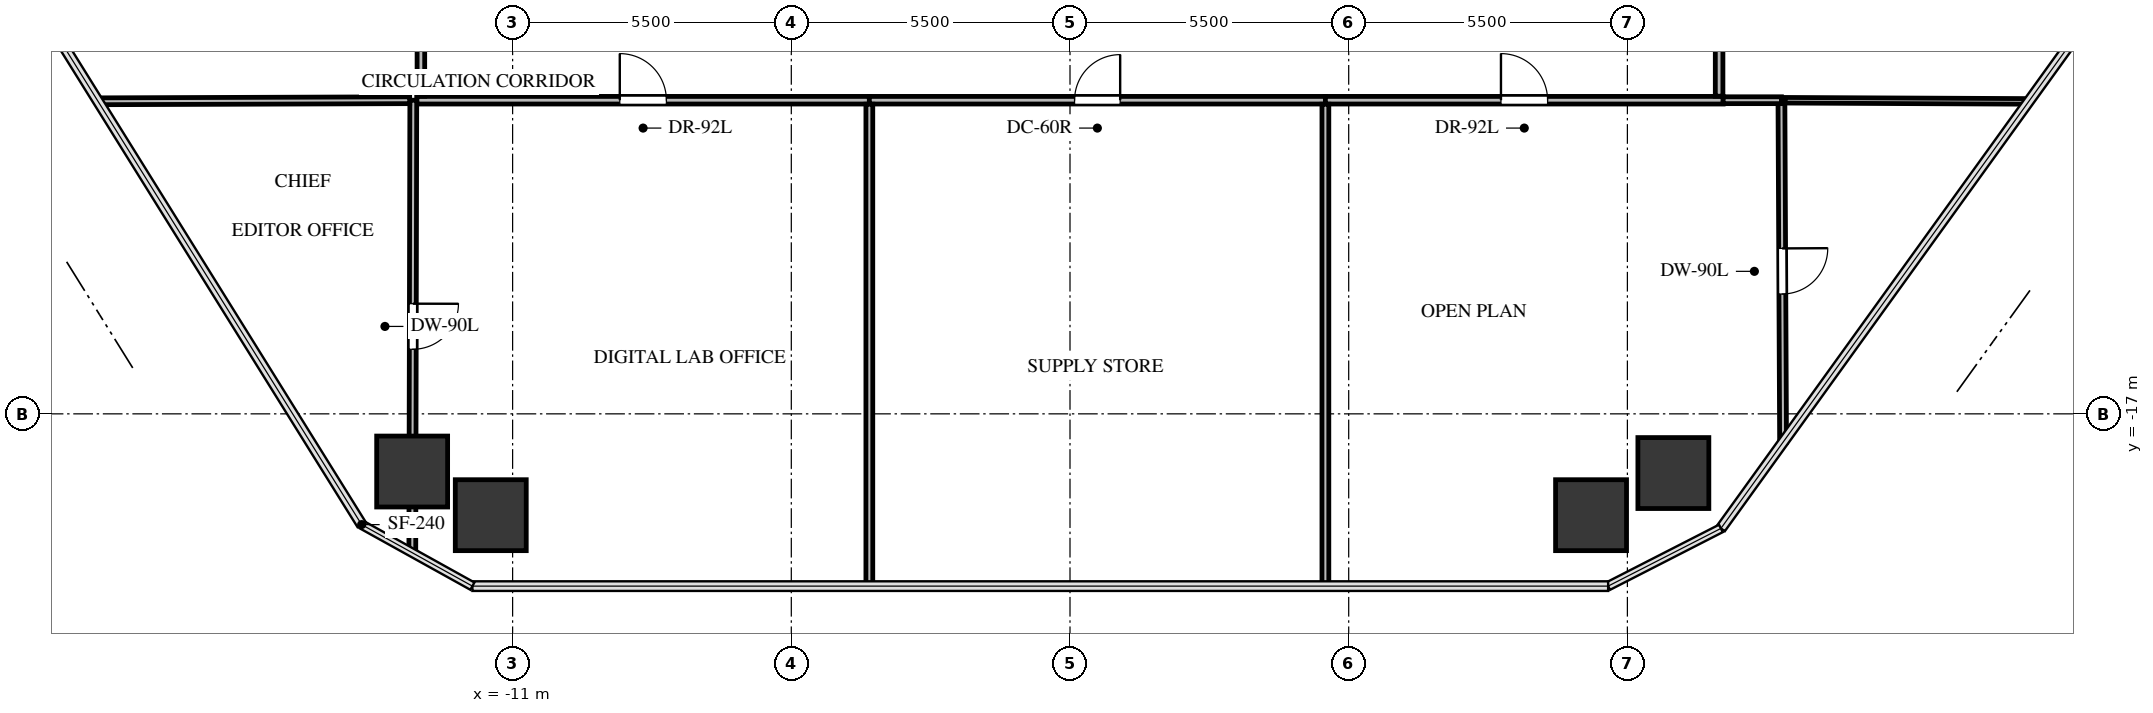
"""IFC4 building model, lengths in metres.
Left out: names, types, materials, properties, quantities, classifications, styles, units other than length and angle.
Written with IfcOpenShell. Run it as: python <this file> out.ifc"""

import sys

from ifc_helpers import new_model, si_unit, direction, frame, frame_2d, origin, origin_2d, place, context, subcontext, project, spatial, rectangle, extrude, source, transform, mapped, element, fill, save


model = new_model("IFC4")
c1 = context("Model", 3, precision=1e-05, world=origin(), true_north=direction((0.0, 1.0)))
c2 = subcontext(c1, "Body", "Model", "MODEL_VIEW")
j1 = project(units=[si_unit("LENGTHUNIT", "METRE"), si_unit("PLANEANGLEUNIT", "RADIAN")], contexts=[c1])
p1 = place(None, origin())
s1 = spatial("IfcSite", under=j1, at=p1, CompositionType="ELEMENT")
p2 = place(p1, origin())
s2 = spatial("IfcBuilding", under=s1, at=p2, CompositionType="ELEMENT")
p3 = place(p2, frame((0.0, 0.0, 84.3)))
s3 = spatial("IfcBuildingStorey", under=s2, at=p3, CompositionType="ELEMENT", Elevation=84.3)
m1 = source(origin(), c2, "Body", "SweptSolid", [
    extrude(rectangle(XDim=1.4, YDim=1.4, at=origin_2d()), origin(), (0.0, 0.0, 1.0), 4.14),
])
for number, where, z_axis, x_axis in (
    (1, (-12.983, -18.138, -0.24), (0.0, 0.0, 1.0), (1.0, 0.0, 0.0)),
    (2, (11.907, -18.168, -0.24), (0.0, 0.0, 1.0), (1.0, 0.0, 0.0)),
    (3, (10.283, -19.0, -0.24), (0.0, 0.0, 1.0), (1.0, 0.0, 0.0)),
    (4, (-11.431, -19.0, -0.24), (0.0, 0.0, 1.0), (1.0, 0.0, 0.0)),
):
    element("IfcColumn", number, at=place(p3, frame(where, z_axis=z_axis, x_axis=x_axis)), inside=s3, PredefinedType="COLUMN", context=c2, shape_type="MappedRepresentation", body=[
        mapped(m1, transform((0.0, 0.0, 0.0), x_axis=(1.0, 0.0, 0.0), y_axis=(0.0, 1.0, 0.0), z_axis=(0.0, 0.0, 1.0), scale=1.0)),
    ])
p4 = place(p3, frame((-12.89, -10.81, 0.0), z_axis=(0.0, 0.0, 1.0), x_axis=(1.0, 0.0, 0.0)))
e5 = element("IfcWall", 5, at=p4, inside=s3, PredefinedType="PARTITIONING", context=c2, shape_type="SweptSolid", body=[
    extrude(rectangle(XDim=8.93, YDim=0.15, at=frame_2d((4.465, 0.0))), origin(), (0.0, 0.0, 1.0), 2.32),
])
p5 = place(p4, frame((4.005, 0.0, 0.0)))
e6 = element("IfcOpeningElement", 6, at=p5, cuts=e5, PredefinedType="OPENING", context=c2, shape_type="SweptSolid", body=[
    extrude(rectangle(XDim=0.92, YDim=2.1, at=frame_2d((0.46, 1.05))), frame((0.0, 0.085, 0.0), z_axis=(0.0, -1.0, 0.0), x_axis=(1.0, 0.0, 0.0)), (0.0, 0.0, 1.0), 0.17),
])
p6 = place(p3, frame((-3.96, -10.81, 0.0), z_axis=(0.0, 0.0, 1.0), x_axis=(1.0, 0.0, 0.0)))
e7 = element("IfcWall", 7, at=p6, inside=s3, PredefinedType="PARTITIONING", context=c2, shape_type="SweptSolid", body=[
    extrude(rectangle(XDim=9.0, YDim=0.15, at=frame_2d((4.5, 0.0))), origin(), (0.0, 0.0, 1.0), 2.32),
])
p7 = place(p6, frame((4.05, 0.0, 0.0)))
e8 = element("IfcOpeningElement", 8, at=p7, cuts=e7, PredefinedType="OPENING", context=c2, shape_type="SweptSolid", body=[
    extrude(rectangle(XDim=0.9, YDim=2.05, at=frame_2d((0.45, 1.025))), frame((0.0, 0.085, 0.0), z_axis=(0.0, -1.0, 0.0), x_axis=(1.0, 0.0, 0.0)), (0.0, 0.0, 1.0), 0.17),
])
p8 = place(p3, frame((5.04, -10.81, 0.0), z_axis=(0.0, 0.0, 1.0), x_axis=(1.0, 0.0, 0.0)))
e9 = element("IfcWall", 9, at=p8, inside=s3, PredefinedType="PARTITIONING", context=c2, shape_type="SweptSolid", body=[
    extrude(rectangle(XDim=7.85, YDim=0.15, at=frame_2d((3.925, 0.0))), origin(), (0.0, 0.0, 1.0), 2.32),
])
p9 = place(p8, frame((3.465, 0.0, 0.0)))
e10 = element("IfcOpeningElement", 10, at=p9, cuts=e9, PredefinedType="OPENING", context=c2, shape_type="SweptSolid", body=[
    extrude(rectangle(XDim=0.92, YDim=2.1, at=frame_2d((0.46, 1.05))), frame((0.0, 0.085, 0.0), z_axis=(0.0, -1.0, 0.0), x_axis=(1.0, 0.0, 0.0)), (0.0, 0.0, 1.0), 0.17),
])
p10 = place(p3, frame((-12.81, 10.731, 0.0), z_axis=(0.0, 0.0, 1.0), x_axis=(0.0, -1.0, 0.0)))
e11 = element("IfcWall", 11, at=p10, inside=s3, PredefinedType="PARTITIONING", context=c2, shape_type="SweptSolid", body=[
    extrude(rectangle(XDim=21.462, YDim=0.15, at=frame_2d((10.731, 0.0))), origin(), (0.0, 0.0, 1.0), 2.32),
])
p11 = place(p10, frame((10.271, 0.0, 0.0)))
e12 = element("IfcOpeningElement", 12, at=p11, cuts=e11, PredefinedType="OPENING", context=c2, shape_type="SweptSolid", body=[
    extrude(rectangle(XDim=0.92, YDim=2.1, at=frame_2d((0.46, 1.05))), frame((0.0, 0.085, 0.0), z_axis=(0.0, -1.0, 0.0), x_axis=(1.0, 0.0, 0.0)), (0.0, 0.0, 1.0), 0.17),
])
p12 = place(p3, frame((12.81, -10.731, 0.0), z_axis=(0.0, 0.0, 1.0), x_axis=(0.0, 1.0, 0.0)))
e13 = element("IfcWall", 13, at=p12, inside=s3, PredefinedType="PARTITIONING", context=c2, shape_type="SweptSolid", body=[
    extrude(rectangle(XDim=2.291, YDim=0.15, at=frame_2d((1.146, 0.0))), origin(), (0.0, 0.0, 1.0), 3.885),
])
p13 = place(p3, frame((-12.96, -10.81, 0.0), z_axis=(0.0, 0.0, 1.0), x_axis=(-0.002186743077, -0.999997609074, 0.0)))
e14 = element("IfcWall", 14, at=p13, inside=s3, PredefinedType="PARTITIONING", context=c2, shape_type="SweptSolid", body=[
    extrude(rectangle(XDim=8.932, YDim=0.135, at=frame_2d((4.466, 0.0))), origin(), (0.0, 0.0, 1.0), 2.32),
])
p14 = place(p13, frame((4.016, 0.0, 0.0)))
e15 = element("IfcOpeningElement", 15, at=p14, cuts=e14, PredefinedType="OPENING", context=c2, shape_type="SweptSolid", body=[
    extrude(rectangle(XDim=0.9, YDim=2.05, at=frame_2d((0.45, 1.025))), frame((0.0, 0.078, 0.0), z_axis=(0.0, -1.0, 0.0), x_axis=(1.0, 0.0, 0.0)), (0.0, 0.0, 1.0), 0.155),
])
p15 = place(p3, frame((-19.182, -10.831, 0.0), z_axis=(0.0, 0.0, 1.0), x_axis=(0.999994173559, 0.003413626758, 0.0)))
e16 = element("IfcWall", 16, at=p15, inside=s3, PredefinedType="PARTITIONING", context=c2, shape_type="SweptSolid", body=[
    extrude(rectangle(XDim=6.151, YDim=0.135, at=frame_2d((3.075, 0.0))), origin(), (0.0, 0.0, 1.0), 2.32),
])
for number, where, z_axis, x_axis in (
    (17, (-3.96, -10.889, 0.0), (0.0, 0.0, 1.0), (0.0, -1.0, 0.0)),
    (18, (5.04, -10.889, 0.0), (0.0, 0.0, 1.0), (0.0, -1.0, 0.0)),
):
    element("IfcWall", number, at=place(p3, frame(where, z_axis=z_axis, x_axis=x_axis)), inside=s3, PredefinedType="PARTITIONING", context=c2, shape_type="SweptSolid", body=[
        extrude(rectangle(XDim=9.511, YDim=0.135, at=frame_2d((4.755, 0.0))), origin(), (0.0, 0.0, 1.0), 2.32),
    ])
p16 = place(p3, frame((14.04, -10.81, 0.0), z_axis=(0.0, 0.0, 1.0), x_axis=(0.004810766872, -0.999988428194, 0.0)))
e19 = element("IfcWall", 19, at=p16, inside=s3, PredefinedType="PARTITIONING", context=c2, shape_type="SweptSolid", body=[
    extrude(rectangle(XDim=6.75, YDim=0.135, at=frame_2d((3.375, 0.0))), origin(), (0.0, 0.0, 1.0), 2.32),
])
p17 = place(p16, frame((2.925, 0.0, 0.0)))
e20 = element("IfcOpeningElement", 20, at=p17, cuts=e19, PredefinedType="OPENING", context=c2, shape_type="SweptSolid", body=[
    extrude(rectangle(XDim=0.9, YDim=2.05, at=frame_2d((0.45, 1.025))), frame((0.0, 0.078, 0.0), z_axis=(0.0, -1.0, 0.0), x_axis=(1.0, 0.0, 0.0)), (0.0, 0.0, 1.0), 0.155),
])
p18 = place(p3, frame((12.89, -10.81, 0.0), z_axis=(0.0, 0.0, 1.0), x_axis=(1.0, 0.0, 0.0)))
e21 = element("IfcWall", 21, at=p18, inside=s3, PredefinedType="PARTITIONING", context=c2, shape_type="SweptSolid", body=[
    extrude(rectangle(XDim=1.15, YDim=0.135, at=frame_2d((0.575, 0.0))), origin(), (0.0, 0.0, 1.0), 3.885),
])
p19 = place(p3, frame((14.112, -10.811, 0.0), z_axis=(0.0, 0.0, 1.0), x_axis=(0.999988860545, -0.004720040808, 0.0)))
e22 = element("IfcWall", 22, at=p19, inside=s3, PredefinedType="MOVABLE", context=c2, shape_type="SweptSolid", body=[
    extrude(rectangle(XDim=4.81, YDim=0.11, at=frame_2d((2.405, 0.0))), origin(), (0.0, 0.0, 1.0), 2.32),
])
m2 = source(origin(), c2, "Body", "SweptSolid", [
    extrude(rectangle(XDim=0.92, YDim=2.1, at=frame_2d((0.46, 1.05))), frame((0.0, 0.025, 0.0), z_axis=(0.0, -1.0, 0.0), x_axis=(1.0, 0.0, 0.0)), (0.0, 0.0, 1.0), 0.05),
])
p20 = place(p5, origin())
e23 = element("IfcDoor", 23, at=p20, inside=s3, OperationType="SINGLE_SWING_LEFT", PredefinedType="DOOR", context=c2, shape_type="MappedRepresentation", body=[
    mapped(m2, transform((0.0, 0.0, 0.0), x_axis=(1.0, 0.0, 0.0), y_axis=(0.0, 1.0, 0.0), z_axis=(0.0, 0.0, 1.0), scale=1.0)),
])
fill(e6, e23)
m3 = source(origin(), c2, "Body", "SweptSolid", [
    extrude(rectangle(XDim=0.9, YDim=2.05, at=frame_2d((0.45, 1.025))), frame((0.0, 0.025, 0.0), z_axis=(0.0, -1.0, 0.0), x_axis=(1.0, 0.0, 0.0)), (0.0, 0.0, 1.0), 0.05),
])
p21 = place(p7, origin())
e24 = element("IfcDoor", 24, at=p21, inside=s3, OperationType="SINGLE_SWING_RIGHT", PredefinedType="DOOR", context=c2, shape_type="MappedRepresentation", body=[
    mapped(m3, transform((0.0, 0.0, 0.0), x_axis=(1.0, 0.0, 0.0), y_axis=(0.0, 1.0, 0.0), z_axis=(0.0, 0.0, 1.0), scale=1.0)),
])
fill(e8, e24)
p22 = place(p9, origin())
e25 = element("IfcDoor", 25, at=p22, inside=s3, OperationType="SINGLE_SWING_LEFT", PredefinedType="DOOR", context=c2, shape_type="MappedRepresentation", body=[
    mapped(m2, transform((0.0, 0.0, 0.0), x_axis=(1.0, 0.0, 0.0), y_axis=(0.0, 1.0, 0.0), z_axis=(0.0, 0.0, 1.0), scale=1.0)),
])
fill(e10, e25)
m4 = source(origin(), c2, "Body", "SweptSolid", [
    extrude(rectangle(XDim=0.9, YDim=2.05, at=frame_2d((0.45, 1.025))), frame((0.0, 0.025, 0.0), z_axis=(0.0, -1.0, 0.0), x_axis=(1.0, 0.0, 0.0)), (0.0, 0.0, 1.0), 0.05),
])
p23 = place(p14, origin())
e26 = element("IfcDoor", 26, at=p23, inside=s3, OperationType="SINGLE_SWING_LEFT", PredefinedType="DOOR", context=c2, shape_type="MappedRepresentation", body=[
    mapped(m4, transform((0.0, 0.0, 0.0), x_axis=(1.0, 0.0, 0.0), y_axis=(0.0, 1.0, 0.0), z_axis=(0.0, 0.0, 1.0), scale=1.0)),
])
fill(e15, e26)
p24 = place(p17, origin())
e27 = element("IfcDoor", 27, at=p24, inside=s3, OperationType="SINGLE_SWING_LEFT", PredefinedType="DOOR", context=c2, shape_type="MappedRepresentation", body=[
    mapped(m4, transform((0.0, 0.0, 0.0), x_axis=(1.0, 0.0, 0.0), y_axis=(0.0, 1.0, 0.0), z_axis=(0.0, 0.0, 1.0), scale=1.0)),
])
fill(e20, e27)
save(model, sys.argv[1])
